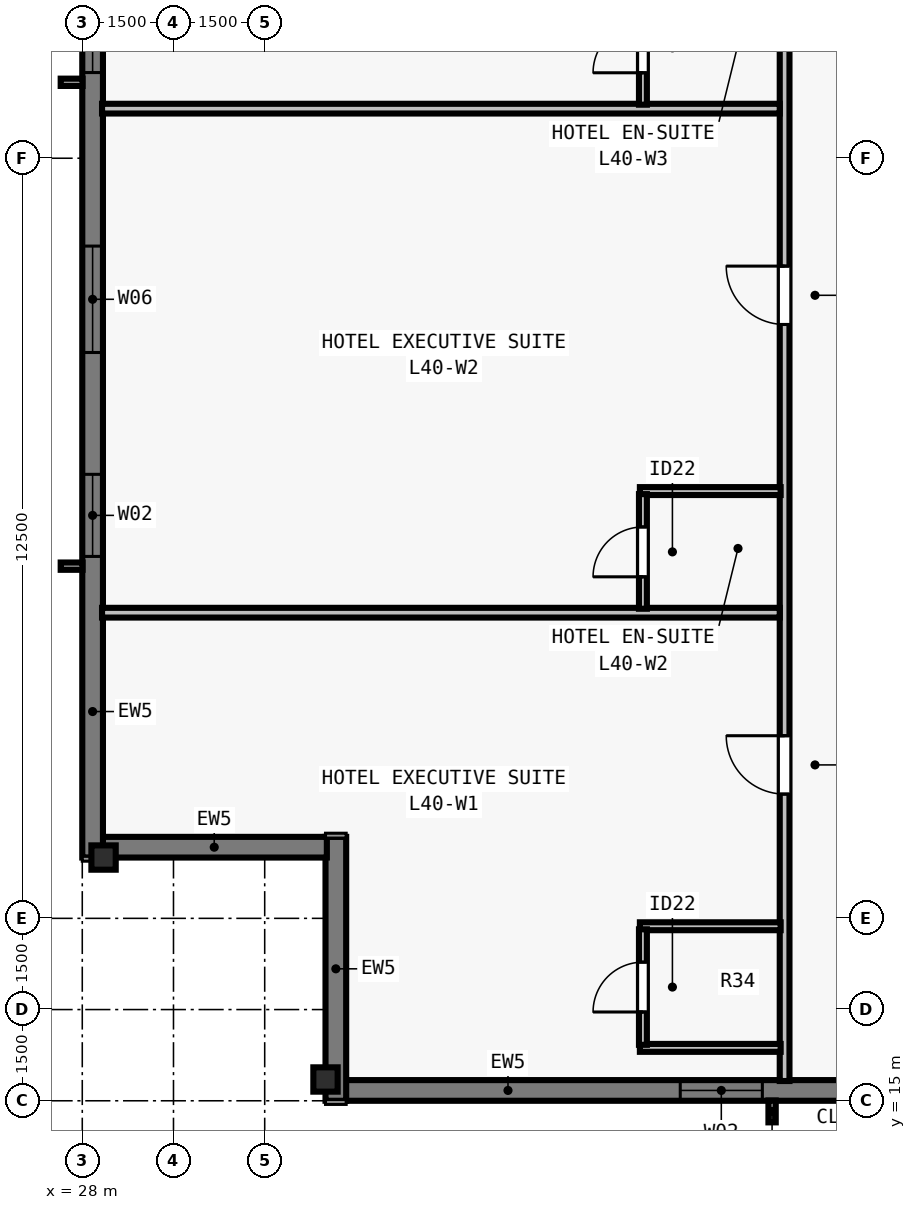
"""IFC4 building model, lengths in metres.
Left out: names, types, materials, properties, quantities, classifications, styles, units other than length and angle.
Written with IfcOpenShell. Run it as: python <this file> out.ifc"""

import sys

from ifc_helpers import new_model, si_unit, direction, frame, frame_2d, origin, origin_2d, place, context, subcontext, project, spatial, rectangle, i_section, extrude, element, fill, save


model = new_model("IFC4")
c1 = context("Model", 3, precision=1e-05, world=origin(), true_north=direction((0.0, 1.0)))
c2 = subcontext(c1, "Body", "Model", "MODEL_VIEW")
j1 = project(units=[si_unit("LENGTHUNIT", "METRE"), si_unit("PLANEANGLEUNIT", "RADIAN")], contexts=[c1])
p1 = place(None, origin())
s1 = spatial("IfcSite", under=j1, at=p1, CompositionType="ELEMENT")
p2 = place(p1, origin())
s2 = spatial("IfcBuilding", under=s1, at=p2, CompositionType="ELEMENT")
p3 = place(p2, frame((0.0, 0.0, 148.0)))
s3 = spatial("IfcBuildingStorey", under=s2, at=p3, CompositionType="ELEMENT", Elevation=148.0)
for number, where, z_axis, x_axis in (
    (1, (32.0, 15.35, 0.0), (0.0, 0.0, 1.0), (1.0, 0.0, 0.0)),
    (2, (28.35, 19.0, 0.0), (0.0, 0.0, 1.0), (0.0, 1.0, 0.0)),
):
    element("IfcColumn", number, at=place(p3, frame(where, z_axis=z_axis, x_axis=x_axis)), inside=s3, PredefinedType="COLUMN", context=c2, shape_type="SweptSolid", body=[
        extrude(i_section(OverallWidth=0.4, OverallDepth=0.4, WebThickness=0.022, FlangeThickness=0.036, at=origin_2d()), origin(), (0.0, 0.0, 1.0), 3.5),
    ])
p4 = place(p3, frame((41.2, 15.17, 0.0), z_axis=(0.0, 0.0, 1.0), x_axis=(-1.0, 0.0, 0.0)))
e3 = element("IfcWall", 3, at=p4, inside=s3, PredefinedType="SOLIDWALL", context=c2, shape_type="SweptSolid", body=[
    extrude(rectangle(XDim=8.882, YDim=0.34, at=frame_2d((4.441, 0.0))), origin(), (0.0, 0.0, 1.0), 3.28),
])
p5 = place(p4, frame((2.016, 0.0, 0.8)))
e4 = element("IfcOpeningElement", 4, at=p5, cuts=e3, PredefinedType="OPENING", context=c2, shape_type="SweptSolid", body=[
    extrude(rectangle(XDim=1.35, YDim=1.66, at=frame_2d((0.675, 0.83))), frame((0.0, 0.18, 0.0), z_axis=(0.0, -1.0, 0.0), x_axis=(1.0, 0.0, 0.0)), (0.0, 0.0, 1.0), 0.36),
])
p6 = place(p3, frame((32.17, 15.0, 0.0), z_axis=(0.0, 0.0, 1.0), x_axis=(0.0, 1.0, 0.0)))
e5 = element("IfcWall", 5, at=p6, inside=s3, PredefinedType="SOLIDWALL", context=c2, shape_type="SweptSolid", body=[
    extrude(rectangle(XDim=4.34, YDim=0.34, at=frame_2d((2.17, 0.0))), origin(), (0.0, 0.0, 1.0), 3.28),
])
p7 = place(p3, frame((32.022, 19.17, 0.0), z_axis=(0.0, 0.0, 1.0), x_axis=(-1.0, 0.0, 0.0)))
e6 = element("IfcWall", 6, at=p7, inside=s3, PredefinedType="SOLIDWALL", context=c2, shape_type="SweptSolid", body=[
    extrude(rectangle(XDim=3.704, YDim=0.34, at=frame_2d((1.852, 0.0))), origin(), (0.0, 0.0, 1.0), 3.28),
])
p8 = place(p3, frame((28.17, 19.0, 0.0), z_axis=(0.0, 0.0, 1.0), x_axis=(0.0, 1.0, 0.0)))
e7 = element("IfcWall", 7, at=p8, inside=s3, PredefinedType="SOLIDWALL", context=c2, shape_type="SweptSolid", body=[
    extrude(rectangle(XDim=39.682, YDim=0.34, at=frame_2d((19.841, 0.0))), origin(), (0.0, 0.0, 1.0), 3.28),
])
p9 = place(p8, frame((4.952, 0.0, 0.8)))
e8 = element("IfcOpeningElement", 8, at=p9, cuts=e7, PredefinedType="OPENING", context=c2, shape_type="SweptSolid", body=[
    extrude(rectangle(XDim=1.35, YDim=1.66, at=frame_2d((0.675, 0.83))), frame((0.0, 0.18, 0.0), z_axis=(0.0, -1.0, 0.0), x_axis=(1.0, 0.0, 0.0)), (0.0, 0.0, 1.0), 0.36),
])
p10 = place(p8, frame((8.305, 0.0, 0.8)))
e9 = element("IfcOpeningElement", 9, at=p10, cuts=e7, PredefinedType="OPENING", context=c2, shape_type="SweptSolid", body=[
    extrude(rectangle(XDim=1.75, YDim=1.66, at=frame_2d((0.875, 0.83))), frame((0.0, 0.18, 0.0), z_axis=(0.0, -1.0, 0.0), x_axis=(1.0, 0.0, 0.0)), (0.0, 0.0, 1.0), 0.36),
])
p11 = place(p8, frame((12.909, 0.0, 0.8)))
e10 = element("IfcOpeningElement", 10, at=p11, cuts=e7, PredefinedType="OPENING", context=c2, shape_type="SweptSolid", body=[
    extrude(rectangle(XDim=1.35, YDim=1.66, at=frame_2d((0.675, 0.83))), frame((0.0, 0.18, 0.0), z_axis=(0.0, -1.0, 0.0), x_axis=(1.0, 0.0, 0.0)), (0.0, 0.0, 1.0), 0.36),
])
p12 = place(p8, frame((16.262, 0.0, 0.8)))
e11 = element("IfcOpeningElement", 11, at=p12, cuts=e7, PredefinedType="OPENING", context=c2, shape_type="SweptSolid", body=[
    extrude(rectangle(XDim=1.75, YDim=1.66, at=frame_2d((0.875, 0.83))), frame((0.0, 0.18, 0.0), z_axis=(0.0, -1.0, 0.0), x_axis=(1.0, 0.0, 0.0)), (0.0, 0.0, 1.0), 0.36),
])
p13 = place(p8, frame((20.416, 0.0, 0.8)))
e12 = element("IfcOpeningElement", 12, at=p13, cuts=e7, PredefinedType="OPENING", context=c2, shape_type="SweptSolid", body=[
    extrude(rectangle(XDim=1.35, YDim=1.66, at=frame_2d((0.675, 0.83))), frame((0.0, 0.18, 0.0), z_axis=(0.0, -1.0, 0.0), x_axis=(1.0, 0.0, 0.0)), (0.0, 0.0, 1.0), 0.36),
])
p14 = place(p8, frame((22.07, 0.0, 0.8)))
e13 = element("IfcOpeningElement", 13, at=p14, cuts=e7, PredefinedType="OPENING", context=c2, shape_type="SweptSolid", body=[
    extrude(rectangle(XDim=1.75, YDim=1.66, at=frame_2d((0.875, 0.83))), frame((0.0, 0.18, 0.0), z_axis=(0.0, -1.0, 0.0), x_axis=(1.0, 0.0, 0.0)), (0.0, 0.0, 1.0), 0.36),
])
p15 = place(p8, frame((26.273, 0.0, 0.8)))
e14 = element("IfcOpeningElement", 14, at=p15, cuts=e7, PredefinedType="OPENING", context=c2, shape_type="SweptSolid", body=[
    extrude(rectangle(XDim=1.35, YDim=1.66, at=frame_2d((0.675, 0.83))), frame((0.0, 0.18, 0.0), z_axis=(0.0, -1.0, 0.0), x_axis=(1.0, 0.0, 0.0)), (0.0, 0.0, 1.0), 0.36),
])
p16 = place(p8, frame((29.627, 0.0, 0.8)))
e15 = element("IfcOpeningElement", 15, at=p16, cuts=e7, PredefinedType="OPENING", context=c2, shape_type="SweptSolid", body=[
    extrude(rectangle(XDim=1.75, YDim=1.66, at=frame_2d((0.875, 0.83))), frame((0.0, 0.18, 0.0), z_axis=(0.0, -1.0, 0.0), x_axis=(1.0, 0.0, 0.0)), (0.0, 0.0, 1.0), 0.36),
])
p17 = place(p8, frame((33.38, 0.0, 0.8)))
e16 = element("IfcOpeningElement", 16, at=p17, cuts=e7, PredefinedType="OPENING", context=c2, shape_type="SweptSolid", body=[
    extrude(rectangle(XDim=1.35, YDim=1.66, at=frame_2d((0.675, 0.83))), frame((0.0, 0.18, 0.0), z_axis=(0.0, -1.0, 0.0), x_axis=(1.0, 0.0, 0.0)), (0.0, 0.0, 1.0), 0.36),
])
p18 = place(p3, frame((39.55, 15.325, 0.0), z_axis=(0.0, 0.0, 1.0), x_axis=(0.0, 1.0, 0.0)))
e17 = element("IfcWall", 17, at=p18, inside=s3, PredefinedType="PARTITIONING", context=c2, shape_type="SweptSolid", body=[
    extrude(rectangle(XDim=47.35, YDim=0.16, at=frame_2d((23.675, 0.0))), origin(), (0.0, 0.0, 1.0), 2.555),
])
p19 = place(p18, frame((4.718, 0.0, 0.0)))
e18 = element("IfcOpeningElement", 18, at=p19, cuts=e17, PredefinedType="OPENING", context=c2, shape_type="SweptSolid", body=[
    extrude(rectangle(XDim=0.96, YDim=2.15, at=frame_2d((0.48, 1.075))), frame((0.0, 0.09, 0.0), z_axis=(0.0, -1.0, 0.0), x_axis=(1.0, 0.0, 0.0)), (0.0, 0.0, 1.0), 0.18),
])
p20 = place(p18, frame((12.441, 0.0, 0.0)))
e19 = element("IfcOpeningElement", 19, at=p20, cuts=e17, PredefinedType="OPENING", context=c2, shape_type="SweptSolid", body=[
    extrude(rectangle(XDim=0.96, YDim=2.15, at=frame_2d((0.48, 1.075))), frame((0.0, 0.09, 0.0), z_axis=(0.0, -1.0, 0.0), x_axis=(1.0, 0.0, 0.0)), (0.0, 0.0, 1.0), 0.18),
])
p21 = place(p18, frame((20.301, 0.0, 0.0)))
e20 = element("IfcOpeningElement", 20, at=p21, cuts=e17, PredefinedType="OPENING", context=c2, shape_type="SweptSolid", body=[
    extrude(rectangle(XDim=0.96, YDim=2.15, at=frame_2d((0.48, 1.075))), frame((0.0, 0.09, 0.0), z_axis=(0.0, -1.0, 0.0), x_axis=(1.0, 0.0, 0.0)), (0.0, 0.0, 1.0), 0.18),
])
p22 = place(p18, frame((28.161, 0.0, 0.0)))
e21 = element("IfcOpeningElement", 21, at=p22, cuts=e17, PredefinedType="OPENING", context=c2, shape_type="SweptSolid", body=[
    extrude(rectangle(XDim=0.96, YDim=2.15, at=frame_2d((0.48, 1.075))), frame((0.0, 0.09, 0.0), z_axis=(0.0, -1.0, 0.0), x_axis=(1.0, 0.0, 0.0)), (0.0, 0.0, 1.0), 0.18),
])
p23 = place(p18, frame((36.021, 0.0, 0.0)))
e22 = element("IfcOpeningElement", 22, at=p23, cuts=e17, PredefinedType="OPENING", context=c2, shape_type="SweptSolid", body=[
    extrude(rectangle(XDim=0.96, YDim=2.15, at=frame_2d((0.48, 1.075))), frame((0.0, 0.09, 0.0), z_axis=(0.0, -1.0, 0.0), x_axis=(1.0, 0.0, 0.0)), (0.0, 0.0, 1.0), 0.18),
])
p24 = place(p18, frame((43.793, 0.0, 0.0)))
e23 = element("IfcOpeningElement", 23, at=p24, cuts=e17, PredefinedType="OPENING", context=c2, shape_type="SweptSolid", body=[
    extrude(rectangle(XDim=0.96, YDim=2.15, at=frame_2d((0.48, 1.075))), frame((0.0, 0.09, 0.0), z_axis=(0.0, -1.0, 0.0), x_axis=(1.0, 0.0, 0.0)), (0.0, 0.0, 1.0), 0.18),
])
for number, where, z_axis, x_axis in (
    (24, (37.17, 15.87, 0.0), (0.0, 0.0, 1.0), (1.0, 0.0, 0.0)),
    (25, (37.17, 17.87, 0.0), (0.0, 0.0, 1.0), (1.0, 0.0, 0.0)),
):
    element("IfcWall", number, at=place(p3, frame(where, z_axis=z_axis, x_axis=x_axis)), inside=s3, PredefinedType="PLUMBINGWALL", context=c2, shape_type="SweptSolid", body=[
        extrude(rectangle(XDim=2.315, YDim=0.13, at=frame_2d((1.158, 0.0))), origin(), (0.0, 0.0, 1.0), 3.28),
    ])
p25 = place(p3, frame((37.22, 15.92, 0.0), z_axis=(0.0, 0.0, 1.0), x_axis=(0.0, 1.0, 0.0)))
e26 = element("IfcWall", 26, at=p25, inside=s3, PredefinedType="PLUMBINGWALL", context=c2, shape_type="SweptSolid", body=[
    extrude(rectangle(XDim=1.9, YDim=0.13, at=frame_2d((0.95, 0.0))), origin(), (0.0, 0.0, 1.0), 3.28),
])
p26 = place(p25, frame((0.54, 0.0, 0.0)))
e27 = element("IfcOpeningElement", 27, at=p26, cuts=e26, PredefinedType="OPENING", context=c2, shape_type="SweptSolid", body=[
    extrude(rectangle(XDim=0.82, YDim=2.1, at=frame_2d((0.41, 1.05))), frame((0.0, 0.075, 0.0), z_axis=(0.0, -1.0, 0.0), x_axis=(1.0, 0.0, 0.0)), (0.0, 0.0, 1.0), 0.15),
])
p27 = place(p3, frame((28.325, 23.027, 0.0), z_axis=(0.0, 0.0, 1.0), x_axis=(1.0, 0.0, 0.0)))
e28 = element("IfcWall", 28, at=p27, inside=s3, PredefinedType="PARTITIONING", context=c2, shape_type="SweptSolid", body=[
    extrude(rectangle(XDim=11.145, YDim=0.16, at=frame_2d((5.573, 0.0))), origin(), (0.0, 0.0, 1.0), 2.896),
])
p28 = place(p3, frame((37.17, 25.027, 0.0), z_axis=(0.0, 0.0, 1.0), x_axis=(1.0, 0.0, 0.0)))
e29 = element("IfcWall", 29, at=p28, inside=s3, PredefinedType="PLUMBINGWALL", context=c2, shape_type="SweptSolid", body=[
    extrude(rectangle(XDim=2.315, YDim=0.13, at=frame_2d((1.158, 0.0))), origin(), (0.0, 0.0, 1.0), 3.28),
])
p29 = place(p3, frame((37.22, 23.092, 0.0), z_axis=(0.0, 0.0, 1.0), x_axis=(0.0, 1.0, 0.0)))
e30 = element("IfcWall", 30, at=p29, inside=s3, PredefinedType="PLUMBINGWALL", context=c2, shape_type="SweptSolid", body=[
    extrude(rectangle(XDim=1.885, YDim=0.13, at=frame_2d((0.942, 0.0))), origin(), (0.0, 0.0, 1.0), 3.28),
])
p30 = place(p29, frame((0.525, 0.0, 0.0)))
e31 = element("IfcOpeningElement", 31, at=p30, cuts=e30, PredefinedType="OPENING", context=c2, shape_type="SweptSolid", body=[
    extrude(rectangle(XDim=0.82, YDim=2.1, at=frame_2d((0.41, 1.05))), frame((0.0, 0.075, 0.0), z_axis=(0.0, -1.0, 0.0), x_axis=(1.0, 0.0, 0.0)), (0.0, 0.0, 1.0), 0.15),
])
p31 = place(p3, frame((28.325, 31.315, 0.0), z_axis=(0.0, 0.0, 1.0), x_axis=(1.0, 0.0, 0.0)))
e32 = element("IfcWall", 32, at=p31, inside=s3, PredefinedType="PARTITIONING", context=c2, shape_type="SweptSolid", body=[
    extrude(rectangle(XDim=11.145, YDim=0.16, at=frame_2d((5.573, 0.0))), origin(), (0.0, 0.0, 1.0), 3.28),
])
p32 = place(p3, frame((37.22, 31.381, 0.0), z_axis=(0.0, 0.0, 1.0), x_axis=(0.0, 1.0, 0.0)))
e33 = element("IfcWall", 33, at=p32, inside=s3, PredefinedType="PLUMBINGWALL", context=c2, shape_type="SweptSolid", body=[
    extrude(rectangle(XDim=1.885, YDim=0.13, at=frame_2d((0.942, 0.0))), origin(), (0.0, 0.0, 1.0), 3.28),
])
p33 = place(p32, frame((0.525, 0.0, 0.0)))
e34 = element("IfcOpeningElement", 34, at=p33, cuts=e33, PredefinedType="OPENING", context=c2, shape_type="SweptSolid", body=[
    extrude(rectangle(XDim=0.82, YDim=2.1, at=frame_2d((0.41, 1.05))), frame((0.0, 0.075, 0.0), z_axis=(0.0, -1.0, 0.0), x_axis=(1.0, 0.0, 0.0)), (0.0, 0.0, 1.0), 0.15),
])
p34 = place(p5, origin())
e35 = element("IfcWindow", 35, at=p34, inside=s3, PartitioningType="SINGLE_PANEL", PredefinedType="WINDOW", context=c2, shape_type="SweptSolid", body=[
    extrude(rectangle(XDim=1.35, YDim=1.66, at=frame_2d((0.675, 0.83))), frame((0.0, -0.05, 0.0), z_axis=(0.0, -1.0, 0.0), x_axis=(1.0, 0.0, 0.0)), (0.0, 0.0, 1.0), 0.06),
])
fill(e4, e35)
p35 = place(p9, origin())
e36 = element("IfcWindow", 36, at=p35, inside=s3, PartitioningType="SINGLE_PANEL", PredefinedType="WINDOW", context=c2, shape_type="SweptSolid", body=[
    extrude(rectangle(XDim=1.35, YDim=1.66, at=frame_2d((0.675, 0.83))), frame((0.0, -0.05, 0.0), z_axis=(0.0, -1.0, 0.0), x_axis=(1.0, 0.0, 0.0)), (0.0, 0.0, 1.0), 0.06),
])
fill(e8, e36)
p36 = place(p10, origin())
e37 = element("IfcWindow", 37, at=p36, inside=s3, PartitioningType="SINGLE_PANEL", PredefinedType="WINDOW", context=c2, shape_type="SweptSolid", body=[
    extrude(rectangle(XDim=1.75, YDim=1.66, at=frame_2d((0.875, 0.83))), frame((0.0, -0.05, 0.0), z_axis=(0.0, -1.0, 0.0), x_axis=(1.0, 0.0, 0.0)), (0.0, 0.0, 1.0), 0.06),
])
fill(e9, e37)
p37 = place(p11, origin())
e38 = element("IfcWindow", 38, at=p37, inside=s3, PartitioningType="SINGLE_PANEL", PredefinedType="WINDOW", context=c2, shape_type="SweptSolid", body=[
    extrude(rectangle(XDim=1.35, YDim=1.66, at=frame_2d((0.675, 0.83))), frame((0.0, -0.05, 0.0), z_axis=(0.0, -1.0, 0.0), x_axis=(1.0, 0.0, 0.0)), (0.0, 0.0, 1.0), 0.06),
])
fill(e10, e38)
p38 = place(p26, origin())
e39 = element("IfcDoor", 39, at=p38, inside=s3, OperationType="SINGLE_SWING_LEFT", PredefinedType="DOOR", context=c2, shape_type="SweptSolid", body=[
    extrude(rectangle(XDim=0.82, YDim=2.1, at=frame_2d((0.41, 1.05))), frame((0.0, 0.025, 0.0), z_axis=(0.0, -1.0, 0.0), x_axis=(1.0, 0.0, 0.0)), (0.0, 0.0, 1.0), 0.05),
])
fill(e27, e39)
p39 = place(p19, origin())
e40 = element("IfcDoor", 40, at=p39, inside=s3, OperationType="SINGLE_SWING_RIGHT", PredefinedType="DOOR", context=c2, shape_type="SweptSolid", body=[
    extrude(rectangle(XDim=0.96, YDim=2.15, at=frame_2d((0.48, 1.075))), frame((0.0, 0.025, 0.0), z_axis=(0.0, -1.0, 0.0), x_axis=(1.0, 0.0, 0.0)), (0.0, 0.0, 1.0), 0.05),
])
fill(e18, e40)
p40 = place(p30, origin())
e41 = element("IfcDoor", 41, at=p40, inside=s3, OperationType="SINGLE_SWING_LEFT", PredefinedType="DOOR", context=c2, shape_type="SweptSolid", body=[
    extrude(rectangle(XDim=0.82, YDim=2.1, at=frame_2d((0.41, 1.05))), frame((0.0, 0.025, 0.0), z_axis=(0.0, -1.0, 0.0), x_axis=(1.0, 0.0, 0.0)), (0.0, 0.0, 1.0), 0.05),
])
fill(e31, e41)
p41 = place(p20, origin())
e42 = element("IfcDoor", 42, at=p41, inside=s3, OperationType="SINGLE_SWING_RIGHT", PredefinedType="DOOR", context=c2, shape_type="SweptSolid", body=[
    extrude(rectangle(XDim=0.96, YDim=2.15, at=frame_2d((0.48, 1.075))), frame((0.0, 0.025, 0.0), z_axis=(0.0, -1.0, 0.0), x_axis=(1.0, 0.0, 0.0)), (0.0, 0.0, 1.0), 0.05),
])
fill(e19, e42)
p42 = place(p33, origin())
e43 = element("IfcDoor", 43, at=p42, inside=s3, OperationType="SINGLE_SWING_LEFT", PredefinedType="DOOR", context=c2, shape_type="SweptSolid", body=[
    extrude(rectangle(XDim=0.82, YDim=2.1, at=frame_2d((0.41, 1.05))), frame((0.0, 0.025, 0.0), z_axis=(0.0, -1.0, 0.0), x_axis=(1.0, 0.0, 0.0)), (0.0, 0.0, 1.0), 0.05),
])
fill(e34, e43)
save(model, sys.argv[1])
